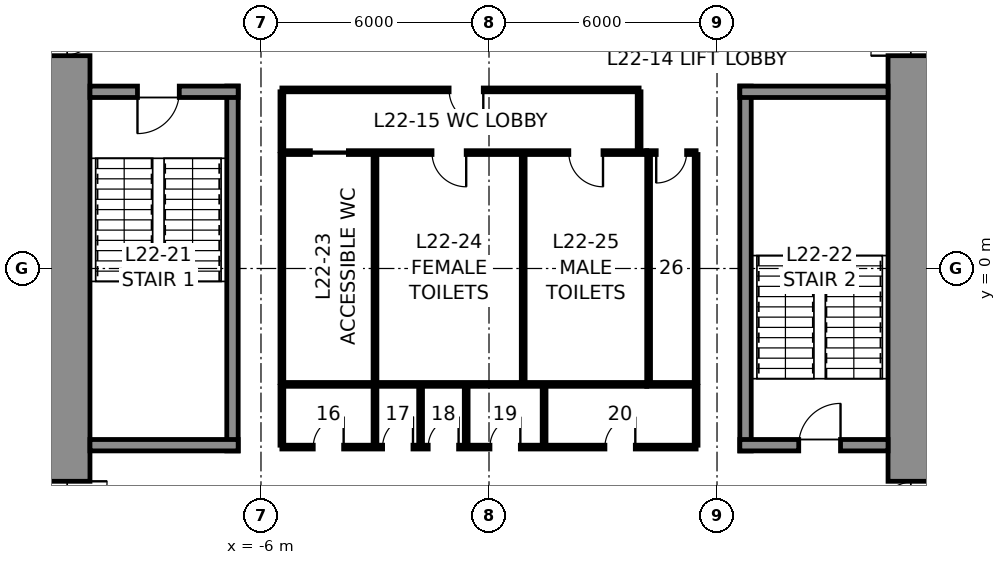
"""IFC4 building model, lengths in metres.
Left out: names, types, materials, properties, quantities, classifications, styles, units other than length and angle.
Written with IfcOpenShell. Run it as: python <this file> out.ifc"""

import sys

from ifc_helpers import new_model, si_unit, direction, frame, frame_2d, origin, place, context, subcontext, project, spatial, rectangle, extrude, element, fill, save


model = new_model("IFC4")
c1 = context("Model", 3, precision=1e-05, world=origin(), true_north=direction((0.0, 1.0)))
c2 = subcontext(c1, "Body", "Model", "MODEL_VIEW")
j1 = project(units=[si_unit("LENGTHUNIT", "METRE"), si_unit("PLANEANGLEUNIT", "RADIAN")], contexts=[c1])
p1 = place(None, origin())
s1 = spatial("IfcSite", under=j1, at=p1, CompositionType="ELEMENT")
p2 = place(p1, origin())
s2 = spatial("IfcBuilding", under=s1, at=p2, CompositionType="ELEMENT")
p3 = place(p2, frame((0.0, 0.0, 113.6)))
s3 = spatial("IfcBuildingStorey", under=s2, at=p3, CompositionType="ELEMENT", Elevation=113.6)
p4 = place(p3, frame((11.25, 10.5, 0.0), z_axis=(0.0, 0.0, 1.0), x_axis=(0.0, -1.0, 0.0)))
e1 = element("IfcWall", 1, at=p4, inside=s3, PredefinedType="SHEAR", context=c2, shape_type="SweptSolid", body=[
    extrude(rectangle(XDim=21.0, YDim=1.5, at=frame_2d((10.5, 0.0))), origin(), (0.0, 0.0, 1.0), 4.6),
])
p5 = place(p4, frame((3.7, 0.0, 0.0)))
e2 = element("IfcOpeningElement", 2, at=p5, cuts=e1, PredefinedType="OPENING", context=c2, shape_type="SweptSolid", body=[
    extrude(rectangle(XDim=1.2, YDim=2.3, at=frame_2d((0.6, 1.15))), frame((0.0, 0.76, 0.0), z_axis=(0.0, -1.0, 0.0), x_axis=(1.0, 0.0, 0.0)), (0.0, 0.0, 1.0), 1.52),
])
p6 = place(p4, frame((16.1, 0.0, 0.0)))
e3 = element("IfcOpeningElement", 3, at=p6, cuts=e1, PredefinedType="OPENING", context=c2, shape_type="SweptSolid", body=[
    extrude(rectangle(XDim=1.2, YDim=2.3, at=frame_2d((0.6, 1.15))), frame((0.0, 0.76, 0.0), z_axis=(0.0, -1.0, 0.0), x_axis=(1.0, 0.0, 0.0)), (0.0, 0.0, 1.0), 1.52),
])
p7 = place(p3, frame((-11.25, -10.5, 0.0), z_axis=(0.0, 0.0, 1.0), x_axis=(0.0, 1.0, 0.0)))
e4 = element("IfcWall", 4, at=p7, inside=s3, PredefinedType="SHEAR", context=c2, shape_type="SweptSolid", body=[
    extrude(rectangle(XDim=21.0, YDim=1.5, at=frame_2d((10.5, 0.0))), origin(), (0.0, 0.0, 1.0), 4.6),
])
p8 = place(p7, frame((16.1, 0.0, 0.0)))
e5 = element("IfcOpeningElement", 5, at=p8, cuts=e4, PredefinedType="OPENING", context=c2, shape_type="SweptSolid", body=[
    extrude(rectangle(XDim=1.2, YDim=2.3, at=frame_2d((0.6, 1.15))), frame((0.0, 0.76, 0.0), z_axis=(0.0, -1.0, 0.0), x_axis=(1.0, 0.0, 0.0)), (0.0, 0.0, 1.0), 1.52),
])
p9 = place(p7, frame((3.7, 0.0, 0.0)))
e6 = element("IfcOpeningElement", 6, at=p9, cuts=e4, PredefinedType="OPENING", context=c2, shape_type="SweptSolid", body=[
    extrude(rectangle(XDim=1.2, YDim=2.3, at=frame_2d((0.6, 1.15))), frame((0.0, 0.76, 0.0), z_axis=(0.0, -1.0, 0.0), x_axis=(1.0, 0.0, 0.0)), (0.0, 0.0, 1.0), 1.52),
])
p10 = place(p3, frame((-6.75, -4.8, 0.0), z_axis=(0.0, 0.0, 1.0), x_axis=(0.0, 1.0, 0.0)))
e7 = element("IfcWall", 7, at=p10, inside=s3, PredefinedType="SOLIDWALL", context=c2, shape_type="SweptSolid", body=[
    extrude(rectangle(XDim=9.6, YDim=0.3, at=frame_2d((4.8, 0.0))), origin(), (0.0, 0.0, 1.0), 4.35),
])
p11 = place(p3, frame((-10.5, 4.65, 0.0), z_axis=(0.0, 0.0, 1.0), x_axis=(1.0, 0.0, 0.0)))
e8 = element("IfcWall", 8, at=p11, inside=s3, PredefinedType="SOLIDWALL", context=c2, shape_type="SweptSolid", body=[
    extrude(rectangle(XDim=3.9, YDim=0.3, at=frame_2d((1.95, 0.0))), origin(), (0.0, 0.0, 1.0), 4.35),
])
p12 = place(p11, frame((1.25, 0.0, 0.0)))
e9 = element("IfcOpeningElement", 9, at=p12, cuts=e8, PredefinedType="OPENING", context=c2, shape_type="SweptSolid", body=[
    extrude(rectangle(XDim=1.1, YDim=2.3, at=frame_2d((0.55, 1.15))), frame((0.0, 0.16, 0.0), z_axis=(0.0, -1.0, 0.0), x_axis=(1.0, 0.0, 0.0)), (0.0, 0.0, 1.0), 0.32),
])
p13 = place(p3, frame((-6.6, -4.65, 0.0), z_axis=(0.0, 0.0, 1.0), x_axis=(-1.0, 0.0, 0.0)))
e10 = element("IfcWall", 10, at=p13, inside=s3, PredefinedType="SOLIDWALL", context=c2, shape_type="SweptSolid", body=[
    extrude(rectangle(XDim=3.9, YDim=0.3, at=frame_2d((1.95, 0.0))), origin(), (0.0, 0.0, 1.0), 4.35),
])
p14 = place(p3, frame((6.75, -4.8, 0.0), z_axis=(0.0, 0.0, 1.0), x_axis=(0.0, 1.0, 0.0)))
e11 = element("IfcWall", 11, at=p14, inside=s3, PredefinedType="SOLIDWALL", context=c2, shape_type="SweptSolid", body=[
    extrude(rectangle(XDim=9.6, YDim=0.3, at=frame_2d((4.8, 0.0))), origin(), (0.0, 0.0, 1.0), 4.35),
])
p15 = place(p3, frame((6.6, 4.65, 0.0), z_axis=(0.0, 0.0, 1.0), x_axis=(1.0, 0.0, 0.0)))
e12 = element("IfcWall", 12, at=p15, inside=s3, PredefinedType="SOLIDWALL", context=c2, shape_type="SweptSolid", body=[
    extrude(rectangle(XDim=3.9, YDim=0.3, at=frame_2d((1.95, 0.0))), origin(), (0.0, 0.0, 1.0), 4.35),
])
p16 = place(p3, frame((10.5, -4.65, 0.0), z_axis=(0.0, 0.0, 1.0), x_axis=(-1.0, 0.0, 0.0)))
e13 = element("IfcWall", 13, at=p16, inside=s3, PredefinedType="SOLIDWALL", context=c2, shape_type="SweptSolid", body=[
    extrude(rectangle(XDim=3.9, YDim=0.3, at=frame_2d((1.95, 0.0))), origin(), (0.0, 0.0, 1.0), 4.35),
])
p17 = place(p16, frame((1.25, 0.0, 0.0)))
e14 = element("IfcOpeningElement", 14, at=p17, cuts=e13, PredefinedType="OPENING", context=c2, shape_type="SweptSolid", body=[
    extrude(rectangle(XDim=1.1, YDim=2.3, at=frame_2d((0.55, 1.15))), frame((0.0, 0.16, 0.0), z_axis=(0.0, -1.0, 0.0), x_axis=(1.0, 0.0, 0.0)), (0.0, 0.0, 1.0), 0.32),
])
p18 = place(p3, frame((-5.45, 3.05, 0.0), z_axis=(0.0, 0.0, 1.0), x_axis=(1.0, 0.0, 0.0)))
e15 = element("IfcWall", 15, at=p18, inside=s3, PredefinedType="PARTITIONING", context=c2, shape_type="SweptSolid", body=[
    extrude(rectangle(XDim=9.6, YDim=0.1, at=frame_2d((4.8, 0.0))), origin(), (0.0, 0.0, 1.0), 4.35),
])
p19 = place(p18, frame((0.75, 0.0, 0.0)))
e16 = element("IfcOpeningElement", 16, at=p19, cuts=e15, PredefinedType="OPENING", context=c2, shape_type="SweptSolid", body=[
    extrude(rectangle(XDim=1.0, YDim=2.3, at=frame_2d((0.5, 1.15))), frame((0.0, 0.06, 0.0), z_axis=(0.0, -1.0, 0.0), x_axis=(1.0, 0.0, 0.0)), (0.0, 0.0, 1.0), 0.12),
])
p20 = place(p18, frame((3.95, 0.0, 0.0)))
e17 = element("IfcOpeningElement", 17, at=p20, cuts=e15, PredefinedType="OPENING", context=c2, shape_type="SweptSolid", body=[
    extrude(rectangle(XDim=0.9, YDim=2.3, at=frame_2d((0.45, 1.15))), frame((0.0, 0.06, 0.0), z_axis=(0.0, -1.0, 0.0), x_axis=(1.0, 0.0, 0.0)), (0.0, 0.0, 1.0), 0.12),
])
p21 = place(p18, frame((7.55, 0.0, 0.0)))
e18 = element("IfcOpeningElement", 18, at=p21, cuts=e15, PredefinedType="OPENING", context=c2, shape_type="SweptSolid", body=[
    extrude(rectangle(XDim=0.9, YDim=2.3, at=frame_2d((0.45, 1.15))), frame((0.0, 0.06, 0.0), z_axis=(0.0, -1.0, 0.0), x_axis=(1.0, 0.0, 0.0)), (0.0, 0.0, 1.0), 0.12),
])
p22 = place(p3, frame((4.15, 3.05, 0.0), z_axis=(0.0, 0.0, 1.0), x_axis=(1.0, 0.0, 0.0)))
e19 = element("IfcWall", 19, at=p22, inside=s3, PredefinedType="PARTITIONING", context=c2, shape_type="SweptSolid", body=[
    extrude(rectangle(XDim=1.3, YDim=0.1, at=frame_2d((0.65, 0.0))), origin(), (0.0, 0.0, 1.0), 4.35),
])
p23 = place(p22, frame((0.25, 0.0, 0.0)))
e20 = element("IfcOpeningElement", 20, at=p23, cuts=e19, PredefinedType="OPENING", context=c2, shape_type="SweptSolid", body=[
    extrude(rectangle(XDim=0.8, YDim=2.3, at=frame_2d((0.4, 1.15))), frame((0.0, 0.06, 0.0), z_axis=(0.0, -1.0, 0.0), x_axis=(1.0, 0.0, 0.0)), (0.0, 0.0, 1.0), 0.12),
])
p24 = place(p3, frame((4.15, -3.05, 0.0), z_axis=(0.0, 0.0, 1.0), x_axis=(-1.0, 0.0, 0.0)))
e21 = element("IfcWall", 21, at=p24, inside=s3, PredefinedType="PARTITIONING", context=c2, shape_type="SweptSolid", body=[
    extrude(rectangle(XDim=9.6, YDim=0.1, at=frame_2d((4.8, 0.0))), origin(), (0.0, 0.0, 1.0), 4.35),
])
p25 = place(p3, frame((5.45, -3.05, 0.0), z_axis=(0.0, 0.0, 1.0), x_axis=(-1.0, 0.0, 0.0)))
e22 = element("IfcWall", 22, at=p25, inside=s3, PredefinedType="PARTITIONING", context=c2, shape_type="SweptSolid", body=[
    extrude(rectangle(XDim=1.3, YDim=0.1, at=frame_2d((0.65, 0.0))), origin(), (0.0, 0.0, 1.0), 4.35),
])
for number, where, z_axis, x_axis in (
    (23, (5.45, 3.0, 0.0), (0.0, 0.0, 1.0), (0.0, -1.0, 0.0)),
    (24, (-5.45, -3.0, 0.0), (0.0, 0.0, 1.0), (0.0, 1.0, 0.0)),
    (25, (-3.0, -3.0, 0.0), (0.0, 0.0, 1.0), (0.0, 1.0, 0.0)),
    (26, (0.9, -3.0, 0.0), (0.0, 0.0, 1.0), (0.0, 1.0, 0.0)),
    (27, (4.2, -3.0, 0.0), (0.0, 0.0, 1.0), (0.0, 1.0, 0.0)),
):
    element("IfcWall", number, at=place(p3, frame(where, z_axis=z_axis, x_axis=x_axis)), inside=s3, PredefinedType="PARTITIONING", context=c2, shape_type="SweptSolid", body=[
        extrude(rectangle(XDim=6.0, YDim=0.1, at=frame_2d((3.0, 0.0))), origin(), (0.0, 0.0, 1.0), 4.35),
    ])
p26 = place(p3, frame((-5.45, 4.7, 0.0), z_axis=(0.0, 0.0, 1.0), x_axis=(1.0, 0.0, 0.0)))
e28 = element("IfcWall", 28, at=p26, inside=s3, PredefinedType="PARTITIONING", context=c2, shape_type="SweptSolid", body=[
    extrude(rectangle(XDim=9.4, YDim=0.1, at=frame_2d((4.7, 0.0))), origin(), (0.0, 0.0, 1.0), 4.35),
])
p27 = place(p26, frame((4.4, 0.0, 0.0)))
e29 = element("IfcOpeningElement", 29, at=p27, cuts=e28, PredefinedType="OPENING", context=c2, shape_type="SweptSolid", body=[
    extrude(rectangle(XDim=0.9, YDim=2.3, at=frame_2d((0.45, 1.15))), frame((0.0, 0.06, 0.0), z_axis=(0.0, -1.0, 0.0), x_axis=(1.0, 0.0, 0.0)), (0.0, 0.0, 1.0), 0.12),
])
for number, where, z_axis, x_axis in (
    (30, (-5.45, 3.1, 0.0), (0.0, 0.0, 1.0), (0.0, 1.0, 0.0)),
    (31, (3.95, 3.1, 0.0), (0.0, 0.0, 1.0), (0.0, 1.0, 0.0)),
):
    element("IfcWall", number, at=place(p3, frame(where, z_axis=z_axis, x_axis=x_axis)), inside=s3, PredefinedType="PARTITIONING", context=c2, shape_type="SweptSolid", body=[
        extrude(rectangle(XDim=1.55, YDim=0.1, at=frame_2d((0.775, 0.0))), origin(), (0.0, 0.0, 1.0), 4.35),
    ])
p28 = place(p3, frame((5.45, -4.7, 0.0), z_axis=(0.0, 0.0, 1.0), x_axis=(-1.0, 0.0, 0.0)))
e32 = element("IfcWall", 32, at=p28, inside=s3, PredefinedType="PARTITIONING", context=c2, shape_type="SweptSolid", body=[
    extrude(rectangle(XDim=10.9, YDim=0.1, at=frame_2d((5.45, 0.0))), origin(), (0.0, 0.0, 1.0), 4.35),
])
p29 = place(p28, frame((9.275, 0.0, 0.0)))
e33 = element("IfcOpeningElement", 33, at=p29, cuts=e32, PredefinedType="OPENING", context=c2, shape_type="SweptSolid", body=[
    extrude(rectangle(XDim=0.8, YDim=2.3, at=frame_2d((0.4, 1.15))), frame((0.0, 0.06, 0.0), z_axis=(0.0, -1.0, 0.0), x_axis=(1.0, 0.0, 0.0)), (0.0, 0.0, 1.0), 0.12),
])
p30 = place(p28, frame((7.45, 0.0, 0.0)))
e34 = element("IfcOpeningElement", 34, at=p30, cuts=e32, PredefinedType="OPENING", context=c2, shape_type="SweptSolid", body=[
    extrude(rectangle(XDim=0.8, YDim=2.3, at=frame_2d((0.4, 1.15))), frame((0.0, 0.06, 0.0), z_axis=(0.0, -1.0, 0.0), x_axis=(1.0, 0.0, 0.0)), (0.0, 0.0, 1.0), 0.12),
])
p31 = place(p28, frame((6.25, 0.0, 0.0)))
e35 = element("IfcOpeningElement", 35, at=p31, cuts=e32, PredefinedType="OPENING", context=c2, shape_type="SweptSolid", body=[
    extrude(rectangle(XDim=0.8, YDim=2.3, at=frame_2d((0.4, 1.15))), frame((0.0, 0.06, 0.0), z_axis=(0.0, -1.0, 0.0), x_axis=(1.0, 0.0, 0.0)), (0.0, 0.0, 1.0), 0.12),
])
p32 = place(p28, frame((4.625, 0.0, 0.0)))
e36 = element("IfcOpeningElement", 36, at=p32, cuts=e32, PredefinedType="OPENING", context=c2, shape_type="SweptSolid", body=[
    extrude(rectangle(XDim=0.8, YDim=2.3, at=frame_2d((0.4, 1.15))), frame((0.0, 0.06, 0.0), z_axis=(0.0, -1.0, 0.0), x_axis=(1.0, 0.0, 0.0)), (0.0, 0.0, 1.0), 0.12),
])
p33 = place(p28, frame((1.6, 0.0, 0.0)))
e37 = element("IfcOpeningElement", 37, at=p33, cuts=e32, PredefinedType="OPENING", context=c2, shape_type="SweptSolid", body=[
    extrude(rectangle(XDim=0.8, YDim=2.3, at=frame_2d((0.4, 1.15))), frame((0.0, 0.06, 0.0), z_axis=(0.0, -1.0, 0.0), x_axis=(1.0, 0.0, 0.0)), (0.0, 0.0, 1.0), 0.12),
])
for number, where, z_axis, x_axis in (
    (38, (-5.45, -3.1, 0.0), (0.0, 0.0, 1.0), (0.0, -1.0, 0.0)),
    (39, (5.45, -3.1, 0.0), (0.0, 0.0, 1.0), (0.0, -1.0, 0.0)),
    (40, (-3.0, -3.1, 0.0), (0.0, 0.0, 1.0), (0.0, -1.0, 0.0)),
    (41, (-1.8, -3.1, 0.0), (0.0, 0.0, 1.0), (0.0, -1.0, 0.0)),
    (42, (-0.6, -3.1, 0.0), (0.0, 0.0, 1.0), (0.0, -1.0, 0.0)),
    (43, (1.45, -3.1, 0.0), (0.0, 0.0, 1.0), (0.0, -1.0, 0.0)),
):
    element("IfcWall", number, at=place(p3, frame(where, z_axis=z_axis, x_axis=x_axis)), inside=s3, PredefinedType="PARTITIONING", context=c2, shape_type="SweptSolid", body=[
        extrude(rectangle(XDim=1.55, YDim=0.1, at=frame_2d((0.775, 0.0))), origin(), (0.0, 0.0, 1.0), 4.35),
    ])
p34 = place(p12, frame((1.1, 0.0, 0.0), z_axis=(0.0, 0.0, 1.0), x_axis=(-1.0, 0.0, 0.0)))
e44 = element("IfcDoor", 44, at=p34, inside=s3, OperationType="SINGLE_SWING_RIGHT", PredefinedType="DOOR", context=c2, shape_type="SweptSolid", body=[
    extrude(rectangle(XDim=1.1, YDim=2.3, at=frame_2d((0.55, 1.15))), frame((0.0, 0.025, 0.0), z_axis=(0.0, -1.0, 0.0), x_axis=(1.0, 0.0, 0.0)), (0.0, 0.0, 1.0), 0.05),
])
fill(e9, e44)
p35 = place(p17, frame((1.1, 0.0, 0.0), z_axis=(0.0, 0.0, 1.0), x_axis=(-1.0, 0.0, 0.0)))
e45 = element("IfcDoor", 45, at=p35, inside=s3, OperationType="SINGLE_SWING_RIGHT", PredefinedType="DOOR", context=c2, shape_type="SweptSolid", body=[
    extrude(rectangle(XDim=1.1, YDim=2.3, at=frame_2d((0.55, 1.15))), frame((0.0, 0.025, 0.0), z_axis=(0.0, -1.0, 0.0), x_axis=(1.0, 0.0, 0.0)), (0.0, 0.0, 1.0), 0.05),
])
fill(e14, e45)
p36 = place(p19, frame((1.0, 0.0, 0.0), z_axis=(0.0, 0.0, 1.0), x_axis=(-1.0, 0.0, 0.0)))
e46 = element("IfcDoor", 46, at=p36, inside=s3, OperationType="SLIDING_TO_LEFT", PredefinedType="DOOR", context=c2, shape_type="SweptSolid", body=[
    extrude(rectangle(XDim=1.0, YDim=2.3, at=frame_2d((0.5, 1.15))), frame((0.0, 0.025, 0.0), z_axis=(0.0, -1.0, 0.0), x_axis=(1.0, 0.0, 0.0)), (0.0, 0.0, 1.0), 0.05),
])
fill(e16, e46)
p37 = place(p20, frame((0.9, 0.0, 0.0), z_axis=(0.0, 0.0, 1.0), x_axis=(-1.0, 0.0, 0.0)))
e47 = element("IfcDoor", 47, at=p37, inside=s3, OperationType="SINGLE_SWING_LEFT", PredefinedType="DOOR", context=c2, shape_type="SweptSolid", body=[
    extrude(rectangle(XDim=0.9, YDim=2.3, at=frame_2d((0.45, 1.15))), frame((0.0, 0.025, 0.0), z_axis=(0.0, -1.0, 0.0), x_axis=(1.0, 0.0, 0.0)), (0.0, 0.0, 1.0), 0.05),
])
fill(e17, e47)
p38 = place(p21, frame((0.9, 0.0, 0.0), z_axis=(0.0, 0.0, 1.0), x_axis=(-1.0, 0.0, 0.0)))
e48 = element("IfcDoor", 48, at=p38, inside=s3, OperationType="SINGLE_SWING_LEFT", PredefinedType="DOOR", context=c2, shape_type="SweptSolid", body=[
    extrude(rectangle(XDim=0.9, YDim=2.3, at=frame_2d((0.45, 1.15))), frame((0.0, 0.025, 0.0), z_axis=(0.0, -1.0, 0.0), x_axis=(1.0, 0.0, 0.0)), (0.0, 0.0, 1.0), 0.05),
])
fill(e18, e48)
p39 = place(p23, frame((0.8, 0.0, 0.0), z_axis=(0.0, 0.0, 1.0), x_axis=(-1.0, 0.0, 0.0)))
e49 = element("IfcDoor", 49, at=p39, inside=s3, OperationType="SINGLE_SWING_RIGHT", PredefinedType="DOOR", context=c2, shape_type="SweptSolid", body=[
    extrude(rectangle(XDim=0.8, YDim=2.3, at=frame_2d((0.4, 1.15))), frame((0.0, 0.025, 0.0), z_axis=(0.0, -1.0, 0.0), x_axis=(1.0, 0.0, 0.0)), (0.0, 0.0, 1.0), 0.05),
])
fill(e20, e49)
p40 = place(p27, frame((0.9, 0.0, 0.0), z_axis=(0.0, 0.0, 1.0), x_axis=(-1.0, 0.0, 0.0)))
e50 = element("IfcDoor", 50, at=p40, inside=s3, OperationType="SINGLE_SWING_LEFT", PredefinedType="DOOR", context=c2, shape_type="SweptSolid", body=[
    extrude(rectangle(XDim=0.9, YDim=2.3, at=frame_2d((0.45, 1.15))), frame((0.0, 0.025, 0.0), z_axis=(0.0, -1.0, 0.0), x_axis=(1.0, 0.0, 0.0)), (0.0, 0.0, 1.0), 0.05),
])
fill(e29, e50)
p41 = place(p29, frame((0.8, 0.0, 0.0), z_axis=(0.0, 0.0, 1.0), x_axis=(-1.0, 0.0, 0.0)))
e51 = element("IfcDoor", 51, at=p41, inside=s3, OperationType="SINGLE_SWING_RIGHT", PredefinedType="DOOR", context=c2, shape_type="SweptSolid", body=[
    extrude(rectangle(XDim=0.8, YDim=2.3, at=frame_2d((0.4, 1.15))), frame((0.0, 0.025, 0.0), z_axis=(0.0, -1.0, 0.0), x_axis=(1.0, 0.0, 0.0)), (0.0, 0.0, 1.0), 0.05),
])
fill(e33, e51)
p42 = place(p30, frame((0.8, 0.0, 0.0), z_axis=(0.0, 0.0, 1.0), x_axis=(-1.0, 0.0, 0.0)))
e52 = element("IfcDoor", 52, at=p42, inside=s3, OperationType="SINGLE_SWING_RIGHT", PredefinedType="DOOR", context=c2, shape_type="SweptSolid", body=[
    extrude(rectangle(XDim=0.8, YDim=2.3, at=frame_2d((0.4, 1.15))), frame((0.0, 0.025, 0.0), z_axis=(0.0, -1.0, 0.0), x_axis=(1.0, 0.0, 0.0)), (0.0, 0.0, 1.0), 0.05),
])
fill(e34, e52)
p43 = place(p31, frame((0.8, 0.0, 0.0), z_axis=(0.0, 0.0, 1.0), x_axis=(-1.0, 0.0, 0.0)))
e53 = element("IfcDoor", 53, at=p43, inside=s3, OperationType="SINGLE_SWING_RIGHT", PredefinedType="DOOR", context=c2, shape_type="SweptSolid", body=[
    extrude(rectangle(XDim=0.8, YDim=2.3, at=frame_2d((0.4, 1.15))), frame((0.0, 0.025, 0.0), z_axis=(0.0, -1.0, 0.0), x_axis=(1.0, 0.0, 0.0)), (0.0, 0.0, 1.0), 0.05),
])
fill(e35, e53)
p44 = place(p32, frame((0.8, 0.0, 0.0), z_axis=(0.0, 0.0, 1.0), x_axis=(-1.0, 0.0, 0.0)))
e54 = element("IfcDoor", 54, at=p44, inside=s3, OperationType="SINGLE_SWING_RIGHT", PredefinedType="DOOR", context=c2, shape_type="SweptSolid", body=[
    extrude(rectangle(XDim=0.8, YDim=2.3, at=frame_2d((0.4, 1.15))), frame((0.0, 0.025, 0.0), z_axis=(0.0, -1.0, 0.0), x_axis=(1.0, 0.0, 0.0)), (0.0, 0.0, 1.0), 0.05),
])
fill(e36, e54)
p45 = place(p33, frame((0.8, 0.0, 0.0), z_axis=(0.0, 0.0, 1.0), x_axis=(-1.0, 0.0, 0.0)))
e55 = element("IfcDoor", 55, at=p45, inside=s3, OperationType="SINGLE_SWING_RIGHT", PredefinedType="DOOR", context=c2, shape_type="SweptSolid", body=[
    extrude(rectangle(XDim=0.8, YDim=2.3, at=frame_2d((0.4, 1.15))), frame((0.0, 0.025, 0.0), z_axis=(0.0, -1.0, 0.0), x_axis=(1.0, 0.0, 0.0)), (0.0, 0.0, 1.0), 0.05),
])
fill(e37, e55)
p46 = place(p8, frame((1.2, 0.0, 0.0), z_axis=(0.0, 0.0, 1.0), x_axis=(-1.0, 0.0, 0.0)))
e56 = element("IfcDoor", 56, at=p46, inside=s3, OperationType="SINGLE_SWING_LEFT", PredefinedType="DOOR", context=c2, shape_type="SweptSolid", body=[
    extrude(rectangle(XDim=1.2, YDim=2.3, at=frame_2d((0.6, 1.15))), frame((0.0, 0.025, 0.0), z_axis=(0.0, -1.0, 0.0), x_axis=(1.0, 0.0, 0.0)), (0.0, 0.0, 1.0), 0.05),
])
fill(e5, e56)
p47 = place(p9, frame((1.2, 0.0, 0.0), z_axis=(0.0, 0.0, 1.0), x_axis=(-1.0, 0.0, 0.0)))
e57 = element("IfcDoor", 57, at=p47, inside=s3, OperationType="SINGLE_SWING_LEFT", PredefinedType="DOOR", context=c2, shape_type="SweptSolid", body=[
    extrude(rectangle(XDim=1.2, YDim=2.3, at=frame_2d((0.6, 1.15))), frame((0.0, 0.025, 0.0), z_axis=(0.0, -1.0, 0.0), x_axis=(1.0, 0.0, 0.0)), (0.0, 0.0, 1.0), 0.05),
])
fill(e6, e57)
p48 = place(p5, frame((1.2, 0.0, 0.0), z_axis=(0.0, 0.0, 1.0), x_axis=(-1.0, 0.0, 0.0)))
e58 = element("IfcDoor", 58, at=p48, inside=s3, OperationType="SINGLE_SWING_LEFT", PredefinedType="DOOR", context=c2, shape_type="SweptSolid", body=[
    extrude(rectangle(XDim=1.2, YDim=2.3, at=frame_2d((0.6, 1.15))), frame((0.0, 0.025, 0.0), z_axis=(0.0, -1.0, 0.0), x_axis=(1.0, 0.0, 0.0)), (0.0, 0.0, 1.0), 0.05),
])
fill(e2, e58)
p49 = place(p6, frame((1.2, 0.0, 0.0), z_axis=(0.0, 0.0, 1.0), x_axis=(-1.0, 0.0, 0.0)))
e59 = element("IfcDoor", 59, at=p49, inside=s3, OperationType="SINGLE_SWING_LEFT", PredefinedType="DOOR", context=c2, shape_type="SweptSolid", body=[
    extrude(rectangle(XDim=1.2, YDim=2.3, at=frame_2d((0.6, 1.15))), frame((0.0, 0.025, 0.0), z_axis=(0.0, -1.0, 0.0), x_axis=(1.0, 0.0, 0.0)), (0.0, 0.0, 1.0), 0.05),
])
fill(e3, e59)
save(model, sys.argv[1])
